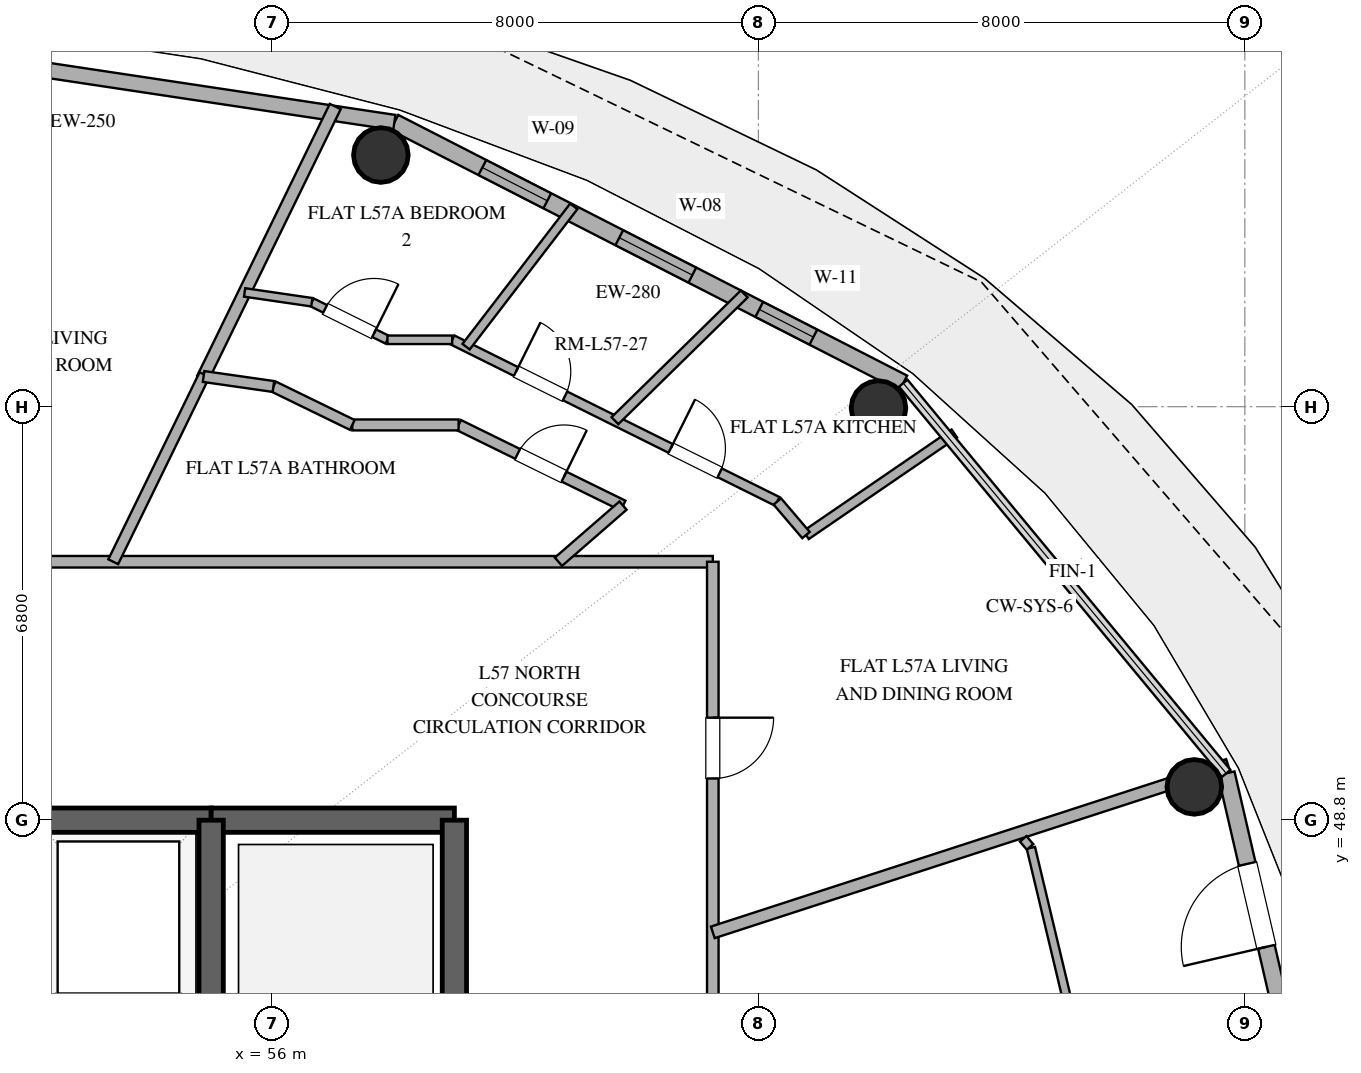
"""IFC4 building model, lengths in metres.
Left out: names, types, materials, properties, quantities, classifications, styles, units other than length and angle.
Written with IfcOpenShell. Run it as: python <this file> out.ifc"""

import sys

from ifc_helpers import new_model, si_unit, direction, frame, frame_2d, origin, origin_2d, place, context, subcontext, project, spatial, rectangle, hollow_circle, extrude, element, fill, save


model = new_model("IFC4")
c1 = context("Model", 3, precision=1e-05, world=origin(), true_north=direction((0.0, 1.0)))
c2 = subcontext(c1, "Body", "Model", "MODEL_VIEW")
j1 = project(units=[si_unit("LENGTHUNIT", "METRE"), si_unit("PLANEANGLEUNIT", "RADIAN")], contexts=[c1])
p1 = place(None, origin())
s1 = spatial("IfcSite", under=j1, at=p1, CompositionType="ELEMENT")
p2 = place(p1, origin())
s2 = spatial("IfcBuilding", under=s1, at=p2, CompositionType="ELEMENT")
p3 = place(p2, frame((0.0, 0.0, 224.4)))
s3 = spatial("IfcBuildingStorey", under=s2, at=p3, CompositionType="ELEMENT", Elevation=224.4)
p4 = place(p3, frame((41.0, 48.8, 0.0), z_axis=(0.0, 0.0, 1.0), x_axis=(1.0, 0.0, 0.0)))
e1 = element("IfcWall", 1, at=p4, inside=s3, PredefinedType="SHEAR", context=c2, shape_type="SweptSolid", body=[
    extrude(rectangle(XDim=14.0, YDim=0.4, at=frame_2d((7.0, 0.0))), origin(), (0.0, 0.0, 1.0), 3.36),
])
p5 = place(p4, frame((6.1, 0.0, 0.0)))
e2 = element("IfcOpeningElement", 2, at=p5, cuts=e1, PredefinedType="OPENING", context=c2, shape_type="SweptSolid", body=[
    extrude(rectangle(XDim=1.8, YDim=2.25, at=frame_2d((0.9, 1.125))), frame((0.0, 0.21, 0.0), z_axis=(0.0, -1.0, 0.0), x_axis=(1.0, 0.0, 0.0)), (0.0, 0.0, 1.0), 0.42),
])
p6 = place(p3, frame((55.0, 48.8, 0.0), z_axis=(0.0, 0.0, 1.0), x_axis=(1.0, 0.0, 0.0)))
e3 = element("IfcWall", 3, at=p6, inside=s3, PredefinedType="SHEAR", context=c2, shape_type="SweptSolid", body=[
    extrude(rectangle(XDim=4.0, YDim=0.4, at=frame_2d((2.0, 0.0))), origin(), (0.0, 0.0, 1.0), 3.36),
])
p7 = place(p3, frame((59.0, 35.2, 0.0), z_axis=(0.0, 0.0, 1.0), x_axis=(0.0, 1.0, 0.0)))
e4 = element("IfcWall", 4, at=p7, inside=s3, PredefinedType="SHEAR", context=c2, shape_type="SweptSolid", body=[
    extrude(rectangle(XDim=13.6, YDim=0.4, at=frame_2d((6.8, 0.0))), origin(), (0.0, 0.0, 1.0), 3.36),
])
p8 = place(p3, frame((55.0, 35.2, 0.0), z_axis=(0.0, 0.0, 1.0), x_axis=(0.0, 1.0, 0.0)))
e5 = element("IfcWall", 5, at=p8, inside=s3, PredefinedType="SHEAR", context=c2, shape_type="SweptSolid", body=[
    extrude(rectangle(XDim=13.6, YDim=0.4, at=frame_2d((6.8, 0.0))), origin(), (0.0, 0.0, 1.0), 3.36),
])
p9 = place(p8, frame((1.15, 0.0, 0.0)))
e6 = element("IfcOpeningElement", 6, at=p9, cuts=e5, PredefinedType="OPENING", context=c2, shape_type="SweptSolid", body=[
    extrude(rectangle(XDim=1.1, YDim=2.2, at=frame_2d((0.55, 1.1))), frame((0.0, 0.21, 0.0), z_axis=(0.0, -1.0, 0.0), x_axis=(1.0, 0.0, 0.0)), (0.0, 0.0, 1.0), 0.42),
])
for number, where, z_axis, x_axis in (
    (7, (71.169, 49.347, 0.0), (0.0, 0.0, 1.0), (1.0, 0.0, 0.0)),
    (8, (65.975, 55.576, 0.0), (0.0, 0.0, 1.0), (1.0, 0.0, 0.0)),
    (9, (57.791, 59.739, 0.0), (0.0, 0.0, 1.0), (1.0, 0.0, 0.0)),
):
    element("IfcColumn", number, at=place(p3, frame(where, z_axis=z_axis, x_axis=x_axis)), inside=s3, PredefinedType="COLUMN", context=c2, shape_type="SweptSolid", body=[
        extrude(hollow_circle(Radius=0.45, WallThickness=0.025, at=origin_2d()), origin(), (0.0, 0.0, 1.0), 3.36),
    ])
p10 = place(p3, frame((73.447, 42.0, 0.0), z_axis=(0.0, 0.0, 1.0), x_axis=(-0.225635078214, 0.974211892495, 0.0)))
e10 = element("IfcWall", 10, at=p10, inside=s3, PredefinedType="SOLIDWALL", context=c2, shape_type="SweptSolid", body=[
    extrude(rectangle(XDim=7.77, YDim=0.28, at=frame_2d((3.885, 0.0))), origin(), (0.0, 0.0, 1.0), 3.36),
])
p11 = place(p10, frame((4.842, 0.0, 0.0)))
e11 = element("IfcOpeningElement", 11, at=p11, cuts=e10, PredefinedType="OPENING", context=c2, shape_type="SweptSolid", body=[
    extrude(rectangle(XDim=1.4, YDim=2.2, at=frame_2d((0.7, 1.1))), frame((0.0, 0.15, 0.0), z_axis=(0.0, -1.0, 0.0), x_axis=(1.0, 0.0, 0.0)), (0.0, 0.0, 1.0), 0.3),
])
p12 = place(p3, frame((66.383, 55.987, 0.0), z_axis=(0.0, 0.0, 1.0), x_axis=(-0.890007394051, 0.455946091699, 0.0)))
e12 = element("IfcWall", 12, at=p12, inside=s3, PredefinedType="SOLIDWALL", context=c2, shape_type="SweptSolid", body=[
    extrude(rectangle(XDim=9.404, YDim=0.28, at=frame_2d((4.702, 0.0))), origin(), (0.0, 0.0, 1.0), 3.36),
])
p13 = place(p12, frame((1.661, 0.0, 0.85)))
e13 = element("IfcOpeningElement", 13, at=p13, cuts=e12, PredefinedType="OPENING", context=c2, shape_type="SweptSolid", body=[
    extrude(rectangle(XDim=1.0, YDim=1.8, at=frame_2d((0.5, 0.9))), frame((0.0, 0.15, 0.0), z_axis=(0.0, -1.0, 0.0), x_axis=(1.0, 0.0, 0.0)), (0.0, 0.0, 1.0), 0.3),
])
p14 = place(p12, frame((3.898, 0.0, 0.85)))
e14 = element("IfcOpeningElement", 14, at=p14, cuts=e12, PredefinedType="OPENING", context=c2, shape_type="SweptSolid", body=[
    extrude(rectangle(XDim=1.35, YDim=1.8, at=frame_2d((0.675, 0.9))), frame((0.0, 0.15, 0.0), z_axis=(0.0, -1.0, 0.0), x_axis=(1.0, 0.0, 0.0)), (0.0, 0.0, 1.0), 0.3),
])
p15 = place(p12, frame((6.578, 0.0, 0.85)))
e15 = element("IfcOpeningElement", 15, at=p15, cuts=e12, PredefinedType="OPENING", context=c2, shape_type="SweptSolid", body=[
    extrude(rectangle(XDim=1.2, YDim=1.8, at=frame_2d((0.6, 0.9))), frame((0.0, 0.15, 0.0), z_axis=(0.0, -1.0, 0.0), x_axis=(1.0, 0.0, 0.0)), (0.0, 0.0, 1.0), 0.3),
])
p16 = place(p3, frame((58.013, 60.274, 0.0), z_axis=(0.0, 0.0, 1.0), x_axis=(-0.988882522213, 0.148698881169, 0.0)))
e16 = element("IfcWall", 16, at=p16, inside=s3, PredefinedType="SOLIDWALL", context=c2, shape_type="SweptSolid", body=[
    extrude(rectangle(XDim=10.125, YDim=0.25, at=frame_2d((5.062, 0.0))), origin(), (0.0, 0.0, 1.0), 3.36),
])
p17 = place(p16, frame((6.534, 0.0, 1.42)))
e17 = element("IfcOpeningElement", 17, at=p17, cuts=e16, PredefinedType="OPENING", context=c2, shape_type="SweptSolid", body=[
    extrude(rectangle(XDim=1.0, YDim=1.05, at=frame_2d((0.5, 0.525))), frame((0.0, 0.135, 0.0), z_axis=(0.0, -1.0, 0.0), x_axis=(1.0, 0.0, 0.0)), (0.0, 0.0, 1.0), 0.27),
])
p18 = place(p3, frame((48.74, 53.05, 0.0), z_axis=(0.0, 0.0, 1.0), x_axis=(1.0, 0.0, 0.0)))
e18 = element("IfcWall", 18, at=p18, inside=s3, PredefinedType="PARTITIONING", context=c2, shape_type="SweptSolid", body=[
    extrude(rectangle(XDim=14.51, YDim=0.19, at=frame_2d((7.255, 0.0))), origin(), (0.0, 0.0, 1.0), 2.72),
])
p19 = place(p18, frame((1.842, 0.0, 0.0)))
e19 = element("IfcOpeningElement", 19, at=p19, cuts=e18, PredefinedType="OPENING", context=c2, shape_type="SweptSolid", body=[
    extrude(rectangle(XDim=1.0, YDim=2.2, at=frame_2d((0.5, 1.1))), frame((0.0, 0.105, 0.0), z_axis=(0.0, -1.0, 0.0), x_axis=(1.0, 0.0, 0.0)), (0.0, 0.0, 1.0), 0.21),
])
p20 = place(p3, frame((63.25, 53.05, 0.0), z_axis=(0.0, 0.0, 1.0), x_axis=(0.0, -1.0, 0.0)))
e20 = element("IfcWall", 20, at=p20, inside=s3, PredefinedType="PARTITIONING", context=c2, shape_type="SweptSolid", body=[
    extrude(rectangle(XDim=16.039, YDim=0.19, at=frame_2d((8.019, 0.0))), origin(), (0.0, 0.0, 1.0), 2.72),
])
p21 = place(p20, frame((9.263, 0.0, 0.0)))
e21 = element("IfcOpeningElement", 21, at=p21, cuts=e20, PredefinedType="OPENING", context=c2, shape_type="SweptSolid", body=[
    extrude(rectangle(XDim=1.0, YDim=2.2, at=frame_2d((0.5, 1.1))), frame((0.0, 0.105, 0.0), z_axis=(0.0, -1.0, 0.0), x_axis=(1.0, 0.0, 0.0)), (0.0, 0.0, 1.0), 0.21),
])
p22 = place(p20, frame((2.564, 0.0, 0.0)))
e22 = element("IfcOpeningElement", 22, at=p22, cuts=e20, PredefinedType="OPENING", context=c2, shape_type="SweptSolid", body=[
    extrude(rectangle(XDim=1.0, YDim=2.2, at=frame_2d((0.5, 1.1))), frame((0.0, 0.105, 0.0), z_axis=(0.0, -1.0, 0.0), x_axis=(1.0, 0.0, 0.0)), (0.0, 0.0, 1.0), 0.21),
])
p23 = place(p3, frame((69.996, 42.0, 0.0), z_axis=(0.0, 0.0, 1.0), x_axis=(-0.232298462197, 0.972644551962, 0.0)))
e23 = element("IfcWall", 23, at=p23, inside=s3, PredefinedType="PARTITIONING", context=c2, shape_type="SweptSolid", body=[
    extrude(rectangle(XDim=6.523, YDim=0.14, at=frame_2d((3.262, 0.0))), origin(), (0.0, 0.0, 1.0), 2.72),
])
p24 = place(p23, frame((2.812, 0.0, 0.0)))
e24 = element("IfcOpeningElement", 24, at=p24, cuts=e23, PredefinedType="OPENING", context=c2, shape_type="SweptSolid", body=[
    extrude(rectangle(XDim=0.9, YDim=2.1, at=frame_2d((0.45, 1.05))), frame((0.0, 0.08, 0.0), z_axis=(0.0, -1.0, 0.0), x_axis=(1.0, 0.0, 0.0)), (0.0, 0.0, 1.0), 0.16),
])
p25 = place(p3, frame((63.25, 46.955, 0.0), z_axis=(0.0, 0.0, 1.0), x_axis=(0.951059035429, 0.30900924117, 0.0)))
e25 = element("IfcWall", 25, at=p25, inside=s3, PredefinedType="PARTITIONING", context=c2, shape_type="SweptSolid", body=[
    extrude(rectangle(XDim=8.91, YDim=0.2, at=frame_2d((4.455, 0.0))), origin(), (0.0, 0.0, 1.0), 2.72),
])
p26 = place(p3, frame((57.041, 60.536, 0.0), z_axis=(0.0, 0.0, 1.0), x_axis=(-0.438355931311, -0.898801467224, 0.0)))
e26 = element("IfcWall", 26, at=p26, inside=s3, PredefinedType="PARTITIONING", context=c2, shape_type="SweptSolid", body=[
    extrude(rectangle(XDim=4.974, YDim=0.2, at=frame_2d((2.487, 0.0))), origin(), (0.0, 0.0, 1.0), 2.72),
])
p27 = place(p3, frame((54.89, 56.127, 0.0), z_axis=(0.0, 0.0, 1.0), x_axis=(-0.438347749683, -0.898805457453, 0.0)))
e27 = element("IfcWall", 27, at=p27, inside=s3, PredefinedType="PLUMBINGWALL", context=c2, shape_type="SweptSolid", body=[
    extrude(rectangle(XDim=3.423, YDim=0.18, at=frame_2d((1.711, 0.0))), origin(), (0.0, 0.0, 1.0), 2.72),
])
p28 = place(p3, frame((58.964, 56.7, 0.0), z_axis=(0.0, 0.0, 1.0), x_axis=(0.895447007867, -0.445168121166, 0.0)))
e28 = element("IfcWall", 28, at=p28, inside=s3, PredefinedType="PLUMBINGWALL", context=c2, shape_type="SweptSolid", body=[
    extrude(rectangle(XDim=5.971, YDim=0.16, at=frame_2d((2.986, 0.0))), origin(), (0.0, 0.0, 1.0), 2.72),
])
p29 = place(p28, frame((4.013, 0.0, 0.0)))
e29 = element("IfcOpeningElement", 29, at=p29, cuts=e28, PredefinedType="OPENING", context=c2, shape_type="SweptSolid", body=[
    extrude(rectangle(XDim=0.9, YDim=2.1, at=frame_2d((0.45, 1.05))), frame((0.0, 0.09, 0.0), z_axis=(0.0, -1.0, 0.0), x_axis=(1.0, 0.0, 0.0)), (0.0, 0.0, 1.0), 0.18),
])
p30 = place(p28, frame((1.173, 0.0, 0.0)))
e30 = element("IfcOpeningElement", 30, at=p30, cuts=e28, PredefinedType="OPENING", context=c2, shape_type="SweptSolid", body=[
    extrude(rectangle(XDim=0.9, YDim=2.1, at=frame_2d((0.45, 1.05))), frame((0.0, 0.09, 0.0), z_axis=(0.0, -1.0, 0.0), x_axis=(1.0, 0.0, 0.0)), (0.0, 0.0, 1.0), 0.18),
])
p31 = place(p3, frame((59.069, 55.3, 0.0), z_axis=(0.0, 0.0, 1.0), x_axis=(0.897805130008, -0.440392947867, 0.0)))
e31 = element("IfcWall", 31, at=p31, inside=s3, PredefinedType="PLUMBINGWALL", context=c2, shape_type="SweptSolid", body=[
    extrude(rectangle(XDim=3.012, YDim=0.18, at=frame_2d((1.506, 0.0))), origin(), (0.0, 0.0, 1.0), 2.72),
])
p32 = place(p31, frame((1.081, 0.0, 0.0)))
e32 = element("IfcOpeningElement", 32, at=p32, cuts=e31, PredefinedType="OPENING", context=c2, shape_type="SweptSolid", body=[
    extrude(rectangle(XDim=0.85, YDim=2.1, at=frame_2d((0.425, 1.05))), frame((0.0, 0.1, 0.0), z_axis=(0.0, -1.0, 0.0), x_axis=(1.0, 0.0, 0.0)), (0.0, 0.0, 1.0), 0.2),
])
p33 = place(p3, frame((63.767, 57.454, 0.0), z_axis=(0.0, 0.0, 1.0), x_axis=(-0.714203003572, -0.699938618515, 0.0)))
e33 = element("IfcWall", 33, at=p33, inside=s3, PredefinedType="PLUMBINGWALL", context=c2, shape_type="SweptSolid", body=[
    extrude(rectangle(XDim=2.978, YDim=0.16, at=frame_2d((1.489, 0.0))), origin(), (0.0, 0.0, 1.0), 2.72),
])
p34 = place(p3, frame((64.783, 53.489, 0.0), z_axis=(0.0, 0.0, 1.0), x_axis=(0.825165456639, 0.564891112666, 0.0)))
e34 = element("IfcWall", 34, at=p34, inside=s3, PredefinedType="PLUMBINGWALL", context=c2, shape_type="SweptSolid", body=[
    extrude(rectangle(XDim=2.957, YDim=0.16, at=frame_2d((1.478, 0.0))), origin(), (0.0, 0.0, 1.0), 2.72),
])
p35 = place(p3, frame((60.964, 58.895, 0.0), z_axis=(0.0, 0.0, 1.0), x_axis=(-0.608822468724, -0.793306499139, 0.0)))
e35 = element("IfcWall", 35, at=p35, inside=s3, PredefinedType="PARTITIONING", context=c2, shape_type="SweptSolid", body=[
    extrude(rectangle(XDim=2.91, YDim=0.15, at=frame_2d((1.455, 0.0))), origin(), (0.0, 0.0, 1.0), 2.72),
])
p36 = place(p3, frame((57.321, 55.3, 0.0), z_axis=(0.0, 0.0, 1.0), x_axis=(1.0, 0.0, 0.0)))
e36 = element("IfcWall", 36, at=p36, inside=s3, PredefinedType="PLUMBINGWALL", context=c2, shape_type="SweptSolid", body=[
    extrude(rectangle(XDim=1.748, YDim=0.18, at=frame_2d((0.874, 0.0))), origin(), (0.0, 0.0, 1.0), 2.72),
])
p37 = place(p3, frame((56.024, 55.932, 0.0), z_axis=(0.0, 0.0, 1.0), x_axis=(0.898916394035, -0.438120207861, 0.0)))
e37 = element("IfcWall", 37, at=p37, inside=s3, PredefinedType="PLUMBINGWALL", context=c2, shape_type="SweptSolid", body=[
    extrude(rectangle(XDim=1.443, YDim=0.18, at=frame_2d((0.721, 0.0))), origin(), (0.0, 0.0, 1.0), 2.72),
])
p38 = place(p3, frame((61.774, 53.973, 0.0), z_axis=(0.0, 0.0, 1.0), x_axis=(-0.7546578079, -0.656118581489, 0.0)))
e38 = element("IfcWall", 38, at=p38, inside=s3, PredefinedType="PLUMBINGWALL", context=c2, shape_type="SweptSolid", body=[
    extrude(rectangle(XDim=1.407, YDim=0.18, at=frame_2d((0.704, 0.0))), origin(), (0.0, 0.0, 1.0), 2.72),
])
p39 = place(p3, frame((56.655, 57.318, 0.0), z_axis=(0.0, 0.0, 1.0), x_axis=(0.895584310315, -0.444891833053, 0.0)))
e39 = element("IfcWall", 39, at=p39, inside=s3, PredefinedType="PARTITIONING", context=c2, shape_type="SweptSolid", body=[
    extrude(rectangle(XDim=1.389, YDim=0.14, at=frame_2d((0.694, 0.0))), origin(), (0.0, 0.0, 1.0), 2.72),
])
p40 = place(p39, frame((0.244, 0.0, 0.0)))
e40 = element("IfcOpeningElement", 40, at=p40, cuts=e39, PredefinedType="OPENING", context=c2, shape_type="SweptSolid", body=[
    extrude(rectangle(XDim=0.9, YDim=2.1, at=frame_2d((0.45, 1.05))), frame((0.0, 0.08, 0.0), z_axis=(0.0, -1.0, 0.0), x_axis=(1.0, 0.0, 0.0)), (0.0, 0.0, 1.0), 0.16),
])
p41 = place(p3, frame((54.875, 56.096, 0.0), z_axis=(0.0, 0.0, 1.0), x_axis=(0.989924230083, -0.141598088596, 0.0)))
e41 = element("IfcWall", 41, at=p41, inside=s3, PredefinedType="PLUMBINGWALL", context=c2, shape_type="SweptSolid", body=[
    extrude(rectangle(XDim=1.16, YDim=0.18, at=frame_2d((0.58, 0.0))), origin(), (0.0, 0.0, 1.0), 2.72),
])
p42 = place(p3, frame((55.55, 57.479, 0.0), z_axis=(0.0, 0.0, 1.0), x_axis=(0.989534281859, -0.144297973051, 0.0)))
e42 = element("IfcWall", 42, at=p42, inside=s3, PredefinedType="PARTITIONING", context=c2, shape_type="SweptSolid", body=[
    extrude(rectangle(XDim=1.117, YDim=0.14, at=frame_2d((0.558, 0.0))), origin(), (0.0, 0.0, 1.0), 2.72),
])
p43 = place(p3, frame((57.899, 56.7, 0.0), z_axis=(0.0, 0.0, 1.0), x_axis=(1.0, 0.0, 0.0)))
e43 = element("IfcWall", 43, at=p43, inside=s3, PredefinedType="PARTITIONING", context=c2, shape_type="SweptSolid", body=[
    extrude(rectangle(XDim=1.065, YDim=0.14, at=frame_2d((0.533, 0.0))), origin(), (0.0, 0.0, 1.0), 2.72),
])
p44 = place(p3, frame((64.311, 54.042, 0.0), z_axis=(0.0, 0.0, 1.0), x_axis=(0.648992334632, -0.760794945823, 0.0)))
e44 = element("IfcWall", 44, at=p44, inside=s3, PredefinedType="PLUMBINGWALL", context=c2, shape_type="SweptSolid", body=[
    extrude(rectangle(XDim=0.727, YDim=0.16, at=frame_2d((0.364, 0.0))), origin(), (0.0, 0.0, 1.0), 2.72),
])
p45 = place(p3, frame((68.468, 48.36, 0.0), z_axis=(0.0, 0.0, 1.0), x_axis=(-0.649065422773, 0.760732592282, 0.0)))
e45 = element("IfcWall", 45, at=p45, inside=s3, PredefinedType="PARTITIONING", context=c2, shape_type="SweptSolid", body=[
    extrude(rectangle(XDim=0.175, YDim=0.14, at=frame_2d((0.087, 0.0))), origin(), (0.0, 0.0, 1.0), 2.72),
])
p46 = place(p11, origin())
e46 = element("IfcDoor", 46, at=p46, inside=s3, OperationType="SINGLE_SWING_LEFT", PredefinedType="DOOR", context=c2, shape_type="SweptSolid", body=[
    extrude(rectangle(XDim=1.4, YDim=2.2, at=frame_2d((0.7, 1.1))), frame((0.0, 0.025, 0.0), z_axis=(0.0, -1.0, 0.0), x_axis=(1.0, 0.0, 0.0)), (0.0, 0.0, 1.0), 0.05),
])
fill(e11, e46)
p47 = place(p13, origin())
e47 = element("IfcWindow", 47, at=p47, inside=s3, PartitioningType="SINGLE_PANEL", PredefinedType="WINDOW", context=c2, shape_type="SweptSolid", body=[
    extrude(rectangle(XDim=1.0, YDim=1.8, at=frame_2d((0.5, 0.9))), frame((0.0, 0.03, 0.0), z_axis=(0.0, -1.0, 0.0), x_axis=(1.0, 0.0, 0.0)), (0.0, 0.0, 1.0), 0.06),
])
fill(e13, e47)
p48 = place(p14, origin())
e48 = element("IfcWindow", 48, at=p48, inside=s3, PartitioningType="SINGLE_PANEL", PredefinedType="WINDOW", context=c2, shape_type="SweptSolid", body=[
    extrude(rectangle(XDim=1.35, YDim=1.8, at=frame_2d((0.675, 0.9))), frame((0.0, 0.03, 0.0), z_axis=(0.0, -1.0, 0.0), x_axis=(1.0, 0.0, 0.0)), (0.0, 0.0, 1.0), 0.06),
])
fill(e14, e48)
p49 = place(p15, origin())
e49 = element("IfcWindow", 49, at=p49, inside=s3, PartitioningType="SINGLE_PANEL", PredefinedType="WINDOW", context=c2, shape_type="SweptSolid", body=[
    extrude(rectangle(XDim=1.2, YDim=1.8, at=frame_2d((0.6, 0.9))), frame((0.0, 0.03, 0.0), z_axis=(0.0, -1.0, 0.0), x_axis=(1.0, 0.0, 0.0)), (0.0, 0.0, 1.0), 0.06),
])
fill(e15, e49)
p50 = place(p22, origin())
e50 = element("IfcDoor", 50, at=p50, inside=s3, OperationType="SINGLE_SWING_LEFT", PredefinedType="DOOR", context=c2, shape_type="SweptSolid", body=[
    extrude(rectangle(XDim=1.0, YDim=2.2, at=frame_2d((0.5, 1.1))), frame((0.0, 0.025, 0.0), z_axis=(0.0, -1.0, 0.0), x_axis=(1.0, 0.0, 0.0)), (0.0, 0.0, 1.0), 0.05),
])
fill(e22, e50)
p51 = place(p29, origin())
e51 = element("IfcDoor", 51, at=p51, inside=s3, OperationType="SINGLE_SWING_LEFT", PredefinedType="DOOR", context=c2, shape_type="SweptSolid", body=[
    extrude(rectangle(XDim=0.9, YDim=2.1, at=frame_2d((0.45, 1.05))), frame((0.0, 0.025, 0.0), z_axis=(0.0, -1.0, 0.0), x_axis=(1.0, 0.0, 0.0)), (0.0, 0.0, 1.0), 0.05),
])
fill(e29, e51)
p52 = place(p30, origin())
e52 = element("IfcDoor", 52, at=p52, inside=s3, OperationType="SINGLE_SWING_LEFT", PredefinedType="DOOR", context=c2, shape_type="SweptSolid", body=[
    extrude(rectangle(XDim=0.9, YDim=2.1, at=frame_2d((0.45, 1.05))), frame((0.0, 0.025, 0.0), z_axis=(0.0, -1.0, 0.0), x_axis=(1.0, 0.0, 0.0)), (0.0, 0.0, 1.0), 0.05),
])
fill(e30, e52)
p53 = place(p32, origin())
e53 = element("IfcDoor", 53, at=p53, inside=s3, OperationType="SINGLE_SWING_RIGHT", PredefinedType="DOOR", context=c2, shape_type="SweptSolid", body=[
    extrude(rectangle(XDim=0.85, YDim=2.1, at=frame_2d((0.425, 1.05))), frame((0.0, 0.025, 0.0), z_axis=(0.0, -1.0, 0.0), x_axis=(1.0, 0.0, 0.0)), (0.0, 0.0, 1.0), 0.05),
])
fill(e32, e53)
p54 = place(p40, origin())
e54 = element("IfcDoor", 54, at=p54, inside=s3, OperationType="SINGLE_SWING_RIGHT", PredefinedType="DOOR", context=c2, shape_type="SweptSolid", body=[
    extrude(rectangle(XDim=0.9, YDim=2.1, at=frame_2d((0.45, 1.05))), frame((0.0, 0.025, 0.0), z_axis=(0.0, -1.0, 0.0), x_axis=(1.0, 0.0, 0.0)), (0.0, 0.0, 1.0), 0.05),
])
fill(e40, e54)
save(model, sys.argv[1])
